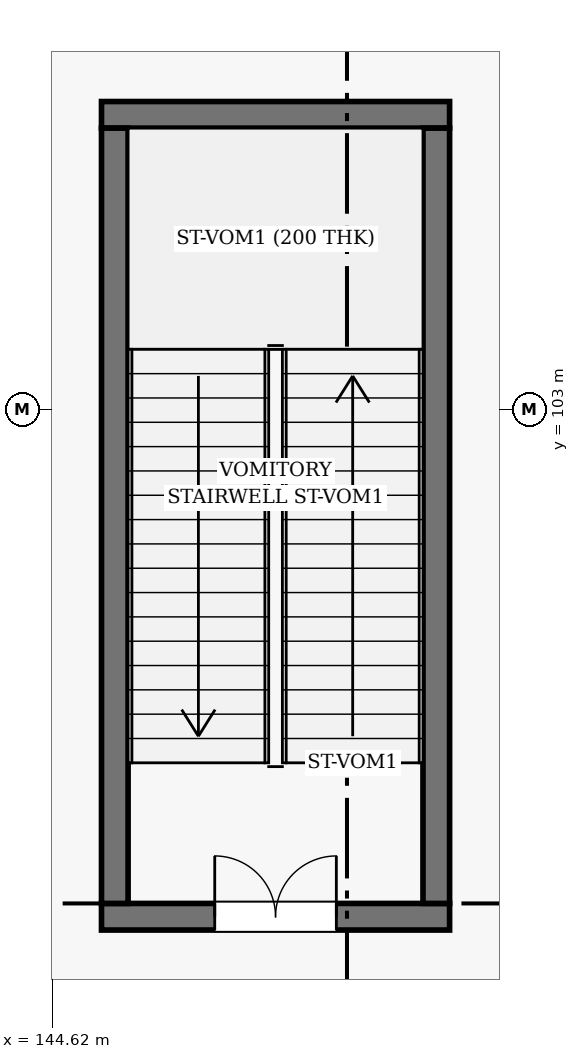
"""IFC4 building model, lengths in metres.
Left out: names, types, materials, properties, quantities, classifications, styles, units other than length and angle.
Written with IfcOpenShell. Run it as: python <this file> out.ifc"""

import sys

from ifc_helpers import new_model, si_unit, direction, frame, frame_2d, origin, place, context, subcontext, project, spatial, rectangle, extrude, element, fill, save


model = new_model("IFC4")
c1 = context("Model", 3, precision=1e-05, world=origin(), true_north=direction((0.0, 1.0)))
c2 = subcontext(c1, "Body", "Model", "MODEL_VIEW")
j1 = project(units=[si_unit("LENGTHUNIT", "METRE"), si_unit("PLANEANGLEUNIT", "RADIAN")], contexts=[c1])
p1 = place(None, origin())
s1 = spatial("IfcSite", under=j1, at=p1, CompositionType="ELEMENT")
p2 = place(p1, origin())
s2 = spatial("IfcBuilding", under=s1, at=p2, CompositionType="ELEMENT")
p3 = place(p2, origin())
s3 = spatial("IfcBuildingStorey", under=s2, at=p3, CompositionType="ELEMENT", Elevation=0.0)
p4 = place(p3, frame((145.27, 96.325, 0.0), z_axis=(0.0, 0.0, 1.0), x_axis=(1.0, 0.0, 0.0)))
e1 = element("IfcWall", 1, at=p4, inside=s3, PredefinedType="SHEAR", context=c2, shape_type="SweptSolid", body=[
    extrude(rectangle(XDim=4.58, YDim=0.35, at=frame_2d((2.29, 0.0))), origin(), (0.0, 0.0, 1.0), 5.16),
])
p5 = place(p4, frame((1.49, 0.0, 0.0)))
e2 = element("IfcOpeningElement", 2, at=p5, cuts=e1, PredefinedType="OPENING", context=c2, shape_type="SweptSolid", body=[
    extrude(rectangle(XDim=1.6, YDim=2.2, at=frame_2d((0.8, 1.1))), frame((0.0, 0.185, 0.0), z_axis=(0.0, -1.0, 0.0), x_axis=(1.0, 0.0, 0.0)), (0.0, 0.0, 1.0), 0.37),
])
p6 = place(p3, frame((149.85, 106.875, 0.0), z_axis=(0.0, 0.0, 1.0), x_axis=(-1.0, 0.0, 0.0)))
e3 = element("IfcWall", 3, at=p6, inside=s3, PredefinedType="SHEAR", context=c2, shape_type="SweptSolid", body=[
    extrude(rectangle(XDim=4.58, YDim=0.35, at=frame_2d((2.29, 0.0))), origin(), (0.0, 0.0, 1.0), 5.16),
])
for number, where, z_axis, x_axis in (
    (4, (145.445, 106.7, 0.0), (0.0, 0.0, 1.0), (0.0, -1.0, 0.0)),
    (5, (149.675, 96.5, 0.0), (0.0, 0.0, 1.0), (0.0, 1.0, 0.0)),
):
    element("IfcWall", number, at=place(p3, frame(where, z_axis=z_axis, x_axis=x_axis)), inside=s3, PredefinedType="SHEAR", context=c2, shape_type="SweptSolid", body=[
        extrude(rectangle(XDim=10.2, YDim=0.35, at=frame_2d((5.1, 0.0))), origin(), (0.0, 0.0, 1.0), 5.16),
    ])
p7 = place(p5, origin())
e6 = element("IfcDoor", 6, at=p7, inside=s3, OperationType="DOUBLE_DOOR_SINGLE_SWING", PredefinedType="DOOR", context=c2, shape_type="SweptSolid", body=[
    extrude(rectangle(XDim=1.6, YDim=2.2, at=frame_2d((0.8, 1.1))), frame((0.0, 0.025, 0.0), z_axis=(0.0, -1.0, 0.0), x_axis=(1.0, 0.0, 0.0)), (0.0, 0.0, 1.0), 0.05),
])
fill(e2, e6)
save(model, sys.argv[1])
